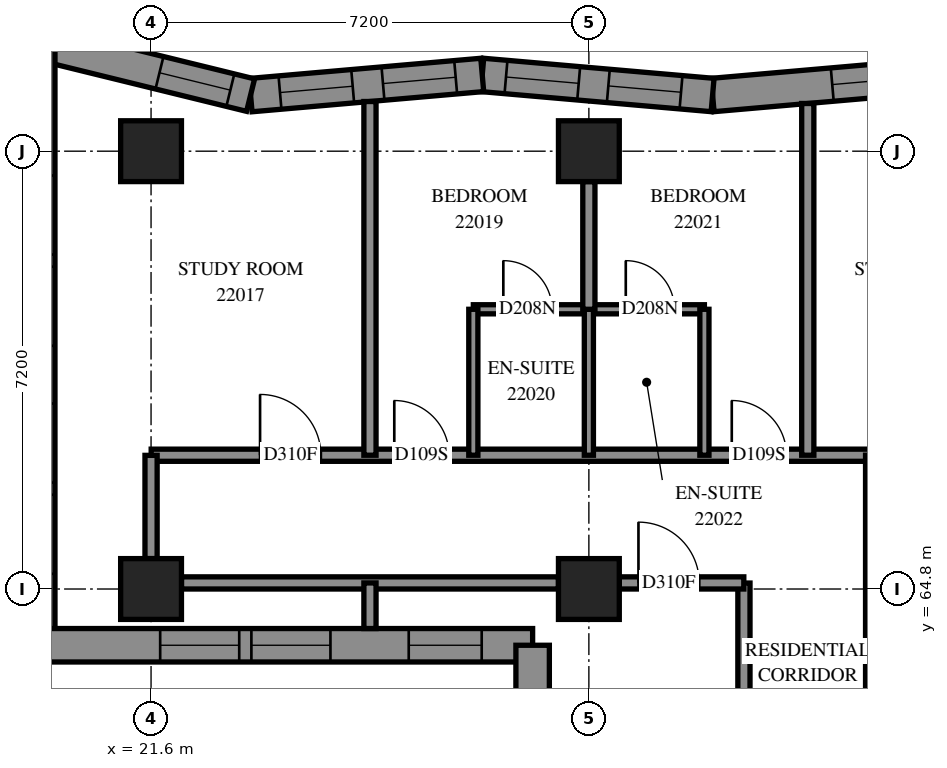
"""IFC4 building model, lengths in metres.
Left out: names, types, materials, properties, quantities, classifications, styles, units other than length and angle.
Written with IfcOpenShell. Run it as: python <this file> out.ifc"""

import sys

from ifc_helpers import new_model, si_unit, direction, frame, frame_2d, origin, origin_2d, place, context, subcontext, project, spatial, polyline, rectangle, outline, extrude, element, fill, save


model = new_model("IFC4")
c1 = context("Model", 3, precision=1e-05, world=origin(), true_north=direction((0.0, 1.0)))
c2 = subcontext(c1, "Body", "Model", "MODEL_VIEW")
j1 = project(units=[si_unit("LENGTHUNIT", "METRE"), si_unit("PLANEANGLEUNIT", "RADIAN")], contexts=[c1])
p1 = place(None, origin())
s1 = spatial("IfcSite", under=j1, at=p1, CompositionType="ELEMENT")
p2 = place(p1, origin())
s2 = spatial("IfcBuilding", under=s1, at=p2, CompositionType="ELEMENT")
p3 = place(p2, frame((0.0, 0.0, 84.6)))
s3 = spatial("IfcBuildingStorey", under=s2, at=p3, CompositionType="ELEMENT", Elevation=84.6)
for number, where, z_axis, x_axis in (
    (1, (21.6, 64.8, 0.0), (0.0, 0.0, 1.0), (1.0, 0.0, 0.0)),
    (2, (21.6, 72.0, 0.0), (0.0, 0.0, 1.0), (1.0, 0.0, 0.0)),
    (3, (28.8, 64.8, 0.0), (0.0, 0.0, 1.0), (1.0, 0.0, 0.0)),
    (4, (28.8, 72.0, 0.0), (0.0, 0.0, 1.0), (1.0, 0.0, 0.0)),
):
    element("IfcColumn", number, at=place(p3, frame(where, z_axis=z_axis, x_axis=x_axis)), inside=s3, PredefinedType="COLUMN", context=c2, shape_type="SweptSolid", body=[
        extrude(rectangle(XDim=1.0, YDim=1.0, at=origin_2d()), origin(), (0.0, 0.0, 1.0), 3.1),
    ])
p4 = place(p3, frame((34.623, 73.254, 0.0), z_axis=(0.0, 0.0, 1.0), x_axis=(-0.9962273538, -0.0867816769, 0.0)))
e5 = element("IfcWall", 5, at=p4, inside=s3, PredefinedType="SOLIDWALL", context=c2, shape_type="SweptSolid", body=[
    extrude(outline(polyline([(-0.024, -0.275), (3.779, -0.275), (3.827, 0.275), (0.024, 0.275), (-0.024, -0.275)])), origin(), (0.0, 0.0, 1.0), 3.1),
])
p5 = place(p4, frame((0.628, 0.0, 0.5)))
e6 = element("IfcOpeningElement", 6, at=p5, cuts=e5, PredefinedType="OPENING", context=c2, shape_type="SweptSolid", body=[
    extrude(rectangle(XDim=1.2, YDim=2.45, at=frame_2d((0.6, 1.225))), frame((0.0, 0.285, 0.0), z_axis=(0.0, -1.0, 0.0), x_axis=(1.0, 0.0, 0.0)), (0.0, 0.0, 1.0), 0.57),
])
p6 = place(p3, frame((30.835, 72.924, 0.0), z_axis=(0.0, 0.0, 1.0), x_axis=(-0.9962273538, 0.0867816769, 0.0)))
e7 = element("IfcWall", 7, at=p6, inside=s3, PredefinedType="SOLIDWALL", context=c2, shape_type="SweptSolid", body=[
    extrude(outline(polyline([(0.024, -0.275), (3.827, -0.275), (3.779, 0.275), (-0.024, 0.275), (0.024, -0.275)])), origin(), (0.0, 0.0, 1.0), 3.1),
])
p7 = place(p6, frame((0.521, 0.0, 0.5)))
e8 = element("IfcOpeningElement", 8, at=p7, cuts=e7, PredefinedType="OPENING", context=c2, shape_type="SweptSolid", body=[
    extrude(rectangle(XDim=1.2, YDim=2.45, at=frame_2d((0.6, 1.225))), frame((0.0, 0.285, 0.0), z_axis=(0.0, -1.0, 0.0), x_axis=(1.0, 0.0, 0.0)), (0.0, 0.0, 1.0), 0.57),
])
p8 = place(p6, frame((2.211, 0.0, 0.5)))
e9 = element("IfcOpeningElement", 9, at=p8, cuts=e7, PredefinedType="OPENING", context=c2, shape_type="SweptSolid", body=[
    extrude(rectangle(XDim=1.2, YDim=2.45, at=frame_2d((0.6, 1.225))), frame((0.0, 0.285, 0.0), z_axis=(0.0, -1.0, 0.0), x_axis=(1.0, 0.0, 0.0)), (0.0, 0.0, 1.0), 0.57),
])
p9 = place(p3, frame((27.047, 73.254, 0.0), z_axis=(0.0, 0.0, 1.0), x_axis=(-0.9962263466, -0.0867932393, 0.0)))
e10 = element("IfcWall", 10, at=p9, inside=s3, PredefinedType="SOLIDWALL", context=c2, shape_type="SweptSolid", body=[
    extrude(outline(polyline([(-0.024, -0.275), (3.779, -0.275), (3.87, 0.275), (0.024, 0.275), (-0.024, -0.275)])), origin(), (0.0, 0.0, 1.0), 3.1),
])
p10 = place(p9, frame((0.439, 0.0, 0.5)))
e11 = element("IfcOpeningElement", 11, at=p10, cuts=e10, PredefinedType="OPENING", context=c2, shape_type="SweptSolid", body=[
    extrude(rectangle(XDim=1.2, YDim=2.45, at=frame_2d((0.6, 1.225))), frame((0.0, 0.285, 0.0), z_axis=(0.0, -1.0, 0.0), x_axis=(1.0, 0.0, 0.0)), (0.0, 0.0, 1.0), 0.57),
])
p11 = place(p9, frame((2.139, 0.0, 0.5)))
e12 = element("IfcOpeningElement", 12, at=p11, cuts=e10, PredefinedType="OPENING", context=c2, shape_type="SweptSolid", body=[
    extrude(rectangle(XDim=1.2, YDim=2.45, at=frame_2d((0.6, 1.225))), frame((0.0, 0.285, 0.0), z_axis=(0.0, -1.0, 0.0), x_axis=(1.0, 0.0, 0.0)), (0.0, 0.0, 1.0), 0.57),
])
p12 = place(p3, frame((23.237, 72.922, 0.0), z_axis=(0.0, 0.0, 1.0), x_axis=(-0.9711660271, 0.2384041692, 0.0)))
e13 = element("IfcWall", 13, at=p12, inside=s3, PredefinedType="SOLIDWALL", context=c2, shape_type="SweptSolid", body=[
    extrude(outline(polyline([(0.045, -0.275), (3.946, -0.275), (3.245, 0.275), (-0.045, 0.275), (0.045, -0.275)])), origin(), (0.0, 0.0, 1.0), 3.1),
])
p13 = place(p12, frame((0.343, 0.0, 0.5)))
e14 = element("IfcOpeningElement", 14, at=p13, cuts=e13, PredefinedType="OPENING", context=c2, shape_type="SweptSolid", body=[
    extrude(rectangle(XDim=1.2, YDim=2.45, at=frame_2d((0.6, 1.225))), frame((0.0, 0.285, 0.0), z_axis=(0.0, -1.0, 0.0), x_axis=(1.0, 0.0, 0.0)), (0.0, 0.0, 1.0), 0.57),
])
p14 = place(p3, frame((19.745, 73.779, 0.0), z_axis=(0.0, 0.0, 1.0), x_axis=(0.0, -1.0, 0.0)))
e15 = element("IfcWall", 15, at=p14, inside=s3, PredefinedType="SOLIDWALL", context=c2, shape_type="SweptSolid", body=[
    extrude(outline(polyline([(-0.351, -0.275), (10.179, -0.275), (9.629, 0.275), (0.351, 0.275), (-0.351, -0.275)])), origin(), (0.0, 0.0, 1.0), 3.1),
])
p15 = place(p14, frame((2.179, 0.0, 0.5)))
e16 = element("IfcOpeningElement", 16, at=p15, cuts=e15, PredefinedType="OPENING", context=c2, shape_type="SweptSolid", body=[
    extrude(rectangle(XDim=1.3, YDim=2.45, at=frame_2d((0.65, 1.225))), frame((0.0, 0.285, 0.0), z_axis=(0.0, -1.0, 0.0), x_axis=(1.0, 0.0, 0.0)), (0.0, 0.0, 1.0), 0.57),
])
p16 = place(p14, frame((3.679, 0.0, 0.5)))
e17 = element("IfcOpeningElement", 17, at=p16, cuts=e15, PredefinedType="OPENING", context=c2, shape_type="SweptSolid", body=[
    extrude(rectangle(XDim=1.3, YDim=2.45, at=frame_2d((0.65, 1.225))), frame((0.0, 0.285, 0.0), z_axis=(0.0, -1.0, 0.0), x_axis=(1.0, 0.0, 0.0)), (0.0, 0.0, 1.0), 0.57),
])
p17 = place(p14, frame((5.929, 0.0, 0.5)))
e18 = element("IfcOpeningElement", 18, at=p17, cuts=e15, PredefinedType="OPENING", context=c2, shape_type="SweptSolid", body=[
    extrude(rectangle(XDim=1.3, YDim=2.45, at=frame_2d((0.65, 1.225))), frame((0.0, 0.285, 0.0), z_axis=(0.0, -1.0, 0.0), x_axis=(1.0, 0.0, 0.0)), (0.0, 0.0, 1.0), 0.57),
])
p18 = place(p14, frame((7.429, 0.0, 0.5)))
e19 = element("IfcOpeningElement", 19, at=p18, cuts=e15, PredefinedType="OPENING", context=c2, shape_type="SweptSolid", body=[
    extrude(rectangle(XDim=1.3, YDim=2.45, at=frame_2d((0.65, 1.225))), frame((0.0, 0.285, 0.0), z_axis=(0.0, -1.0, 0.0), x_axis=(1.0, 0.0, 0.0)), (0.0, 0.0, 1.0), 0.57),
])
p19 = place(p3, frame((19.745, 63.875, 0.0), z_axis=(0.0, 0.0, 1.0), x_axis=(1.0, 0.0, 0.0)))
e20 = element("IfcWall", 20, at=p19, inside=s3, PredefinedType="SOLIDWALL", context=c2, shape_type="SweptSolid", body=[
    extrude(outline(polyline([(-0.275, -0.275), (7.855, -0.275), (8.405, 0.275), (0.275, 0.275), (-0.275, -0.275)])), origin(), (0.0, 0.0, 1.0), 3.1),
])
p20 = place(p19, frame((2.005, 0.0, 0.5)))
e21 = element("IfcOpeningElement", 21, at=p20, cuts=e20, PredefinedType="OPENING", context=c2, shape_type="SweptSolid", body=[
    extrude(rectangle(XDim=1.3, YDim=2.45, at=frame_2d((0.65, 1.225))), frame((0.0, 0.285, 0.0), z_axis=(0.0, -1.0, 0.0), x_axis=(1.0, 0.0, 0.0)), (0.0, 0.0, 1.0), 0.57),
])
p21 = place(p19, frame((3.505, 0.0, 0.5)))
e22 = element("IfcOpeningElement", 22, at=p21, cuts=e20, PredefinedType="OPENING", context=c2, shape_type="SweptSolid", body=[
    extrude(rectangle(XDim=1.3, YDim=2.45, at=frame_2d((0.65, 1.225))), frame((0.0, 0.285, 0.0), z_axis=(0.0, -1.0, 0.0), x_axis=(1.0, 0.0, 0.0)), (0.0, 0.0, 1.0), 0.57),
])
p22 = place(p19, frame((6.093, 0.0, 0.5)))
e23 = element("IfcOpeningElement", 23, at=p22, cuts=e20, PredefinedType="OPENING", context=c2, shape_type="SweptSolid", body=[
    extrude(rectangle(XDim=1.2, YDim=2.45, at=frame_2d((0.6, 1.225))), frame((0.0, 0.285, 0.0), z_axis=(0.0, -1.0, 0.0), x_axis=(1.0, 0.0, 0.0)), (0.0, 0.0, 1.0), 0.57),
])
p23 = place(p3, frame((27.875, 63.875, 0.0), z_axis=(0.0, 0.0, 1.0), x_axis=(0.0, -1.0, 0.0)))
e24 = element("IfcWall", 24, at=p23, inside=s3, PredefinedType="SOLIDWALL", context=c2, shape_type="SweptSolid", body=[
    extrude(outline(polyline([(0.275, -0.275), (8.405, -0.275), (7.855, 0.275), (-0.275, 0.275), (0.275, -0.275)])), origin(), (0.0, 0.0, 1.0), 3.1),
])
p24 = place(p23, frame((4.825, 0.0, 0.5)))
e25 = element("IfcOpeningElement", 25, at=p24, cuts=e24, PredefinedType="OPENING", context=c2, shape_type="SweptSolid", body=[
    extrude(rectangle(XDim=1.3, YDim=2.45, at=frame_2d((0.65, 1.225))), frame((0.0, 0.285, 0.0), z_axis=(0.0, -1.0, 0.0), x_axis=(1.0, 0.0, 0.0)), (0.0, 0.0, 1.0), 0.57),
])
p25 = place(p23, frame((1.738, 0.0, 0.5)))
e26 = element("IfcOpeningElement", 26, at=p25, cuts=e24, PredefinedType="OPENING", context=c2, shape_type="SweptSolid", body=[
    extrude(rectangle(XDim=1.2, YDim=2.45, at=frame_2d((0.6, 1.225))), frame((0.0, 0.285, 0.0), z_axis=(0.0, -1.0, 0.0), x_axis=(1.0, 0.0, 0.0)), (0.0, 0.0, 1.0), 0.57),
])
p26 = place(p23, frame((3.9, 0.0, 0.45)))
e27 = element("IfcOpeningElement", 27, at=p26, cuts=e24, PredefinedType="OPENING", context=c2, shape_type="SweptSolid", body=[
    extrude(rectangle(XDim=0.8, YDim=2.5, at=frame_2d((0.4, 1.25))), frame((0.0, 0.285, 0.0), z_axis=(0.0, -1.0, 0.0), x_axis=(1.0, 0.0, 0.0)), (0.0, 0.0, 1.0), 0.57),
])
p27 = place(p3, frame((21.602, 67.0, 0.0), z_axis=(0.0, 0.0, 1.0), x_axis=(1.0, 0.0, 0.0)))
e28 = element("IfcWall", 28, at=p27, inside=s3, PredefinedType="PARTITIONING", context=c2, shape_type="SweptSolid", body=[
    extrude(rectangle(XDim=11.848, YDim=0.2, at=frame_2d((5.924, 0.0))), origin(), (0.0, 0.0, 1.0), 3.1),
])
p28 = place(p27, frame((1.791, 0.0, 0.0)))
e29 = element("IfcOpeningElement", 29, at=p28, cuts=e28, PredefinedType="OPENING", context=c2, shape_type="SweptSolid", body=[
    extrude(rectangle(XDim=1.0, YDim=2.1, at=frame_2d((0.5, 1.05))), frame((0.0, 0.11, 0.0), z_axis=(0.0, -1.0, 0.0), x_axis=(1.0, 0.0, 0.0)), (0.0, 0.0, 1.0), 0.22),
])
p29 = place(p27, frame((3.998, 0.0, 0.0)))
e30 = element("IfcOpeningElement", 30, at=p29, cuts=e28, PredefinedType="OPENING", context=c2, shape_type="SweptSolid", body=[
    extrude(rectangle(XDim=0.9, YDim=2.1, at=frame_2d((0.45, 1.05))), frame((0.0, 0.11, 0.0), z_axis=(0.0, -1.0, 0.0), x_axis=(1.0, 0.0, 0.0)), (0.0, 0.0, 1.0), 0.22),
])
p30 = place(p27, frame((9.548, 0.0, 0.0)))
e31 = element("IfcOpeningElement", 31, at=p30, cuts=e28, PredefinedType="OPENING", context=c2, shape_type="SweptSolid", body=[
    extrude(rectangle(XDim=0.9, YDim=2.1, at=frame_2d((0.45, 1.05))), frame((0.0, 0.11, 0.0), z_axis=(0.0, -1.0, 0.0), x_axis=(1.0, 0.0, 0.0)), (0.0, 0.0, 1.0), 0.22),
])
p31 = place(p3, frame((22.1, 64.9, 0.0), z_axis=(0.0, 0.0, 1.0), x_axis=(1.0, 0.0, 0.0)))
e32 = element("IfcWall", 32, at=p31, inside=s3, PredefinedType="PARTITIONING", context=c2, shape_type="SweptSolid", body=[
    extrude(rectangle(XDim=6.2, YDim=0.2, at=frame_2d((3.1, 0.0))), origin(), (0.0, 0.0, 1.0), 2.6),
])
p32 = place(p3, frame((25.2, 67.0, 0.0), z_axis=(0.0, 0.0, 1.0), x_axis=(0.0, 1.0, 0.0)))
e33 = element("IfcWall", 33, at=p32, inside=s3, PredefinedType="PARTITIONING", context=c2, shape_type="SweptSolid", body=[
    extrude(rectangle(XDim=5.817, YDim=0.2, at=frame_2d((2.909, 0.0))), origin(), (0.0, 0.0, 1.0), 3.1),
])
p33 = place(p3, frame((32.4, 67.0, 0.0), z_axis=(0.0, 0.0, 1.0), x_axis=(0.0, 1.0, 0.0)))
e34 = element("IfcWall", 34, at=p33, inside=s3, PredefinedType="PARTITIONING", context=c2, shape_type="SweptSolid", body=[
    extrude(rectangle(XDim=5.784, YDim=0.2, at=frame_2d((2.892, 0.0))), origin(), (0.0, 0.0, 1.0), 3.1),
])
p34 = place(p3, frame((33.45, 62.252, 0.0), z_axis=(0.0, 0.0, 1.0), x_axis=(0.0, 1.0, 0.0)))
e35 = element("IfcWall", 35, at=p34, inside=s3, PredefinedType="PARTITIONING", context=c2, shape_type="SweptSolid", body=[
    extrude(rectangle(XDim=4.748, YDim=0.2, at=frame_2d((2.374, 0.0))), origin(), (0.0, 0.0, 1.0), 3.1),
])
p35 = place(p3, frame((26.9, 69.4, 0.0), z_axis=(0.0, 0.0, 1.0), x_axis=(1.0, 0.0, 0.0)))
e36 = element("IfcWall", 36, at=p35, inside=s3, PredefinedType="PARTITIONING", context=c2, shape_type="SweptSolid", body=[
    extrude(rectangle(XDim=3.8, YDim=0.15, at=frame_2d((1.9, 0.0))), origin(), (0.0, 0.0, 1.0), 3.1),
])
p36 = place(p35, frame((0.493, 0.0, 0.0)))
e37 = element("IfcOpeningElement", 37, at=p36, cuts=e36, PredefinedType="OPENING", context=c2, shape_type="SweptSolid", body=[
    extrude(rectangle(XDim=0.8, YDim=2.1, at=frame_2d((0.4, 1.05))), frame((0.0, 0.085, 0.0), z_axis=(0.0, -1.0, 0.0), x_axis=(1.0, 0.0, 0.0)), (0.0, 0.0, 1.0), 0.17),
])
p37 = place(p35, frame((2.507, 0.0, 0.0)))
e38 = element("IfcOpeningElement", 38, at=p37, cuts=e36, PredefinedType="OPENING", context=c2, shape_type="SweptSolid", body=[
    extrude(rectangle(XDim=0.8, YDim=2.1, at=frame_2d((0.4, 1.05))), frame((0.0, 0.085, 0.0), z_axis=(0.0, -1.0, 0.0), x_axis=(1.0, 0.0, 0.0)), (0.0, 0.0, 1.0), 0.17),
])
p38 = place(p3, frame((31.35, 62.252, 0.0), z_axis=(0.0, 0.0, 1.0), x_axis=(0.0, 1.0, 0.0)))
e39 = element("IfcWall", 39, at=p38, inside=s3, PredefinedType="PARTITIONING", context=c2, shape_type="SweptSolid", body=[
    extrude(rectangle(XDim=2.646, YDim=0.2, at=frame_2d((1.323, 0.0))), origin(), (0.0, 0.0, 1.0), 3.1),
])
for number, where, z_axis, x_axis in (
    (40, (26.9, 67.0, 0.0), (0.0, 0.0, 1.0), (0.0, 1.0, 0.0)),
    (41, (28.8, 67.0, 0.0), (0.0, 0.0, 1.0), (0.0, 1.0, 0.0)),
    (42, (30.7, 67.0, 0.0), (0.0, 0.0, 1.0), (0.0, 1.0, 0.0)),
):
    element("IfcWall", number, at=place(p3, frame(where, z_axis=z_axis, x_axis=x_axis)), inside=s3, PredefinedType="PARTITIONING", context=c2, shape_type="SweptSolid", body=[
        extrude(rectangle(XDim=2.4, YDim=0.15, at=frame_2d((1.2, 0.0))), origin(), (0.0, 0.0, 1.0), 3.1),
    ])
p39 = place(p3, frame((28.8, 69.4, 0.0), z_axis=(0.0, 0.0, 1.0), x_axis=(0.0, 1.0, 0.0)))
e43 = element("IfcWall", 43, at=p39, inside=s3, PredefinedType="PARTITIONING", context=c2, shape_type="SweptSolid", body=[
    extrude(rectangle(XDim=2.1, YDim=0.2, at=frame_2d((1.05, 0.0))), origin(), (0.0, 0.0, 1.0), 3.1),
])
p40 = place(p3, frame((29.3, 64.9, 0.0), z_axis=(0.0, 0.0, 1.0), x_axis=(1.0, 0.0, 0.0)))
e44 = element("IfcWall", 44, at=p40, inside=s3, PredefinedType="PARTITIONING", context=c2, shape_type="SweptSolid", body=[
    extrude(rectangle(XDim=2.048, YDim=0.2, at=frame_2d((1.024, 0.0))), origin(), (0.0, 0.0, 1.0), 3.1),
])
p41 = place(p40, frame((0.316, 0.0, 0.0)))
e45 = element("IfcOpeningElement", 45, at=p41, cuts=e44, PredefinedType="OPENING", context=c2, shape_type="SweptSolid", body=[
    extrude(rectangle(XDim=1.0, YDim=2.1, at=frame_2d((0.5, 1.05))), frame((0.0, 0.11, 0.0), z_axis=(0.0, -1.0, 0.0), x_axis=(1.0, 0.0, 0.0)), (0.0, 0.0, 1.0), 0.22),
])
p42 = place(p3, frame((21.6, 65.3, 0.0), z_axis=(0.0, 0.0, 1.0), x_axis=(0.0, 1.0, 0.0)))
e46 = element("IfcWall", 46, at=p42, inside=s3, PredefinedType="PARTITIONING", context=c2, shape_type="SweptSolid", body=[
    extrude(rectangle(XDim=1.698, YDim=0.2, at=frame_2d((0.849, 0.0))), origin(), (0.0, 0.0, 1.0), 2.6),
])
p43 = place(p3, frame((25.2, 64.15, 0.0), z_axis=(0.0, 0.0, 1.0), x_axis=(0.0, 1.0, 0.0)))
e47 = element("IfcWall", 47, at=p43, inside=s3, PredefinedType="PARTITIONING", context=c2, shape_type="SweptSolid", body=[
    extrude(rectangle(XDim=0.75, YDim=0.2, at=frame_2d((0.375, 0.0))), origin(), (0.0, 0.0, 1.0), 3.1),
])
p44 = place(p5, origin())
e48 = element("IfcWindow", 48, at=p44, inside=s3, PartitioningType="SINGLE_PANEL", PredefinedType="WINDOW", context=c2, shape_type="SweptSolid", body=[
    extrude(rectangle(XDim=1.2, YDim=2.45, at=frame_2d((0.6, 1.225))), frame((0.0, 0.155, 0.0), z_axis=(0.0, -1.0, 0.0), x_axis=(1.0, 0.0, 0.0)), (0.0, 0.0, 1.0), 0.06),
])
fill(e6, e48)
p45 = place(p7, origin())
e49 = element("IfcWindow", 49, at=p45, inside=s3, PartitioningType="SINGLE_PANEL", PredefinedType="WINDOW", context=c2, shape_type="SweptSolid", body=[
    extrude(rectangle(XDim=1.2, YDim=2.45, at=frame_2d((0.6, 1.225))), frame((0.0, 0.155, 0.0), z_axis=(0.0, -1.0, 0.0), x_axis=(1.0, 0.0, 0.0)), (0.0, 0.0, 1.0), 0.06),
])
fill(e8, e49)
p46 = place(p8, origin())
e50 = element("IfcWindow", 50, at=p46, inside=s3, PartitioningType="SINGLE_PANEL", PredefinedType="WINDOW", context=c2, shape_type="SweptSolid", body=[
    extrude(rectangle(XDim=1.2, YDim=2.45, at=frame_2d((0.6, 1.225))), frame((0.0, 0.155, 0.0), z_axis=(0.0, -1.0, 0.0), x_axis=(1.0, 0.0, 0.0)), (0.0, 0.0, 1.0), 0.06),
])
fill(e9, e50)
p47 = place(p10, origin())
e51 = element("IfcWindow", 51, at=p47, inside=s3, PartitioningType="SINGLE_PANEL", PredefinedType="WINDOW", context=c2, shape_type="SweptSolid", body=[
    extrude(rectangle(XDim=1.2, YDim=2.45, at=frame_2d((0.6, 1.225))), frame((0.0, 0.155, 0.0), z_axis=(0.0, -1.0, 0.0), x_axis=(1.0, 0.0, 0.0)), (0.0, 0.0, 1.0), 0.06),
])
fill(e11, e51)
p48 = place(p11, origin())
e52 = element("IfcWindow", 52, at=p48, inside=s3, PartitioningType="SINGLE_PANEL", PredefinedType="WINDOW", context=c2, shape_type="SweptSolid", body=[
    extrude(rectangle(XDim=1.2, YDim=2.45, at=frame_2d((0.6, 1.225))), frame((0.0, 0.155, 0.0), z_axis=(0.0, -1.0, 0.0), x_axis=(1.0, 0.0, 0.0)), (0.0, 0.0, 1.0), 0.06),
])
fill(e12, e52)
p49 = place(p13, origin())
e53 = element("IfcWindow", 53, at=p49, inside=s3, PartitioningType="SINGLE_PANEL", PredefinedType="WINDOW", context=c2, shape_type="SweptSolid", body=[
    extrude(rectangle(XDim=1.2, YDim=2.45, at=frame_2d((0.6, 1.225))), frame((0.0, 0.155, 0.0), z_axis=(0.0, -1.0, 0.0), x_axis=(1.0, 0.0, 0.0)), (0.0, 0.0, 1.0), 0.06),
])
fill(e14, e53)
p50 = place(p20, origin())
e54 = element("IfcWindow", 54, at=p50, inside=s3, PartitioningType="SINGLE_PANEL", PredefinedType="WINDOW", context=c2, shape_type="SweptSolid", body=[
    extrude(rectangle(XDim=1.3, YDim=2.45, at=frame_2d((0.65, 1.225))), frame((0.0, 0.155, 0.0), z_axis=(0.0, -1.0, 0.0), x_axis=(1.0, 0.0, 0.0)), (0.0, 0.0, 1.0), 0.06),
])
fill(e21, e54)
p51 = place(p21, origin())
e55 = element("IfcWindow", 55, at=p51, inside=s3, PartitioningType="SINGLE_PANEL", PredefinedType="WINDOW", context=c2, shape_type="SweptSolid", body=[
    extrude(rectangle(XDim=1.3, YDim=2.45, at=frame_2d((0.65, 1.225))), frame((0.0, 0.155, 0.0), z_axis=(0.0, -1.0, 0.0), x_axis=(1.0, 0.0, 0.0)), (0.0, 0.0, 1.0), 0.06),
])
fill(e22, e55)
p52 = place(p22, origin())
e56 = element("IfcWindow", 56, at=p52, inside=s3, PartitioningType="SINGLE_PANEL", PredefinedType="WINDOW", context=c2, shape_type="SweptSolid", body=[
    extrude(rectangle(XDim=1.2, YDim=2.45, at=frame_2d((0.6, 1.225))), frame((0.0, 0.155, 0.0), z_axis=(0.0, -1.0, 0.0), x_axis=(1.0, 0.0, 0.0)), (0.0, 0.0, 1.0), 0.06),
])
fill(e23, e56)
p53 = place(p28, origin())
e57 = element("IfcDoor", 57, at=p53, inside=s3, OperationType="SINGLE_SWING_RIGHT", PredefinedType="DOOR", context=c2, shape_type="SweptSolid", body=[
    extrude(rectangle(XDim=1.0, YDim=2.1, at=frame_2d((0.5, 1.05))), frame((0.0, 0.025, 0.0), z_axis=(0.0, -1.0, 0.0), x_axis=(1.0, 0.0, 0.0)), (0.0, 0.0, 1.0), 0.05),
])
fill(e29, e57)
p54 = place(p41, origin())
e58 = element("IfcDoor", 58, at=p54, inside=s3, OperationType="SINGLE_SWING_RIGHT", PredefinedType="DOOR", context=c2, shape_type="SweptSolid", body=[
    extrude(rectangle(XDim=1.0, YDim=2.1, at=frame_2d((0.5, 1.05))), frame((0.0, 0.025, 0.0), z_axis=(0.0, -1.0, 0.0), x_axis=(1.0, 0.0, 0.0)), (0.0, 0.0, 1.0), 0.05),
])
fill(e45, e58)
p55 = place(p29, origin())
e59 = element("IfcDoor", 59, at=p55, inside=s3, OperationType="SINGLE_SWING_LEFT", PredefinedType="DOOR", context=c2, shape_type="SweptSolid", body=[
    extrude(rectangle(XDim=0.9, YDim=2.1, at=frame_2d((0.45, 1.05))), frame((0.0, 0.025, 0.0), z_axis=(0.0, -1.0, 0.0), x_axis=(1.0, 0.0, 0.0)), (0.0, 0.0, 1.0), 0.05),
])
fill(e30, e59)
p56 = place(p36, origin())
e60 = element("IfcDoor", 60, at=p56, inside=s3, OperationType="SINGLE_SWING_RIGHT", PredefinedType="DOOR", context=c2, shape_type="SweptSolid", body=[
    extrude(rectangle(XDim=0.8, YDim=2.1, at=frame_2d((0.4, 1.05))), frame((0.0, 0.025, 0.0), z_axis=(0.0, -1.0, 0.0), x_axis=(1.0, 0.0, 0.0)), (0.0, 0.0, 1.0), 0.05),
])
fill(e37, e60)
p57 = place(p30, origin())
e61 = element("IfcDoor", 61, at=p57, inside=s3, OperationType="SINGLE_SWING_RIGHT", PredefinedType="DOOR", context=c2, shape_type="SweptSolid", body=[
    extrude(rectangle(XDim=0.9, YDim=2.1, at=frame_2d((0.45, 1.05))), frame((0.0, 0.025, 0.0), z_axis=(0.0, -1.0, 0.0), x_axis=(1.0, 0.0, 0.0)), (0.0, 0.0, 1.0), 0.05),
])
fill(e31, e61)
p58 = place(p37, origin())
e62 = element("IfcDoor", 62, at=p58, inside=s3, OperationType="SINGLE_SWING_RIGHT", PredefinedType="DOOR", context=c2, shape_type="SweptSolid", body=[
    extrude(rectangle(XDim=0.8, YDim=2.1, at=frame_2d((0.4, 1.05))), frame((0.0, 0.025, 0.0), z_axis=(0.0, -1.0, 0.0), x_axis=(1.0, 0.0, 0.0)), (0.0, 0.0, 1.0), 0.05),
])
fill(e38, e62)
save(model, sys.argv[1])
